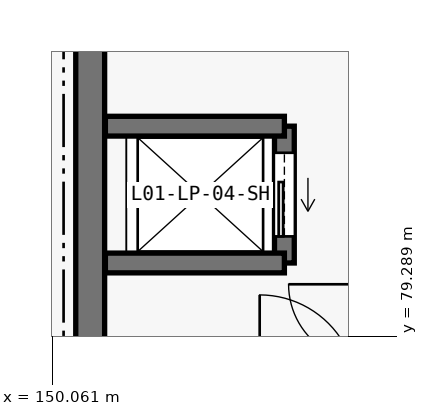
"""IFC4 building model, lengths in metres.
Left out: names, types, materials, properties, quantities, classifications, styles, units other than length and angle.
Written with IfcOpenShell. Run it as: python <this file> out.ifc"""

import sys

from ifc_helpers import new_model, si_unit, direction, frame, frame_2d, origin, place, context, subcontext, project, spatial, rectangle, extrude, element, fill, save


model = new_model("IFC4")
c1 = context("Model", 3, precision=1e-05, world=origin(), true_north=direction((0.0, 1.0)))
c2 = subcontext(c1, "Body", "Model", "MODEL_VIEW")
j1 = project(units=[si_unit("LENGTHUNIT", "METRE"), si_unit("PLANEANGLEUNIT", "RADIAN")], contexts=[c1])
p1 = place(None, origin())
s1 = spatial("IfcSite", under=j1, at=p1, CompositionType="ELEMENT")
p2 = place(p1, origin())
s2 = spatial("IfcBuilding", under=s1, at=p2, CompositionType="ELEMENT")
p3 = place(p2, frame((0.0, 0.0, 6.0)))
s3 = spatial("IfcBuildingStorey", under=s2, at=p3, CompositionType="ELEMENT", Elevation=6.0)
p4 = place(p3, frame((150.56, 87.35, 0.0), z_axis=(0.0, 0.0, 1.0), x_axis=(0.0, -1.0, 0.0)))
e1 = element("IfcWall", 1, at=p4, inside=s3, PredefinedType="SHEAR", context=c2, shape_type="SweptSolid", body=[
    extrude(rectangle(XDim=8.8, YDim=0.38, at=frame_2d((4.4, 0.0))), origin(), (0.0, 0.0, 1.0), 4.8),
])
p5 = place(p3, frame((153.115, 80.25, 0.0), z_axis=(0.0, 0.0, 1.0), x_axis=(0.0, 1.0, 0.0)))
e2 = element("IfcWall", 2, at=p5, inside=s3, PredefinedType="SHEAR", context=c2, shape_type="SweptSolid", body=[
    extrude(rectangle(XDim=1.8, YDim=0.26, at=frame_2d((0.9, 0.0))), origin(), (0.0, 0.0, 1.0), 4.8),
])
p6 = place(p5, frame((0.35, 0.0, 0.0)))
e3 = element("IfcOpeningElement", 3, at=p6, cuts=e2, PredefinedType="OPENING", context=c2, shape_type="SweptSolid", body=[
    extrude(rectangle(XDim=1.1, YDim=2.15, at=frame_2d((0.55, 1.075))), frame((0.0, 0.14, 0.0), z_axis=(0.0, -1.0, 0.0), x_axis=(1.0, 0.0, 0.0)), (0.0, 0.0, 1.0), 0.28),
])
for number, where, z_axis, x_axis in (
    (4, (150.76, 80.25, 0.0), (0.0, 0.0, 1.0), (1.0, 0.0, 0.0)),
    (5, (150.76, 82.05, 0.0), (0.0, 0.0, 1.0), (1.0, 0.0, 0.0)),
):
    element("IfcWall", number, at=place(p3, frame(where, z_axis=z_axis, x_axis=x_axis)), inside=s3, PredefinedType="SHEAR", context=c2, shape_type="SweptSolid", body=[
        extrude(rectangle(XDim=2.355, YDim=0.26, at=frame_2d((1.177, 0.0))), origin(), (0.0, 0.0, 1.0), 4.8),
    ])
p7 = place(p6, origin())
e6 = element("IfcDoor", 6, at=p7, inside=s3, OperationType="SLIDING_TO_LEFT", PredefinedType="DOOR", context=c2, shape_type="SweptSolid", body=[
    extrude(rectangle(XDim=1.1, YDim=2.15, at=frame_2d((0.55, 1.075))), frame((0.0, 0.025, 0.0), z_axis=(0.0, -1.0, 0.0), x_axis=(1.0, 0.0, 0.0)), (0.0, 0.0, 1.0), 0.05),
])
fill(e3, e6)
save(model, sys.argv[1])
